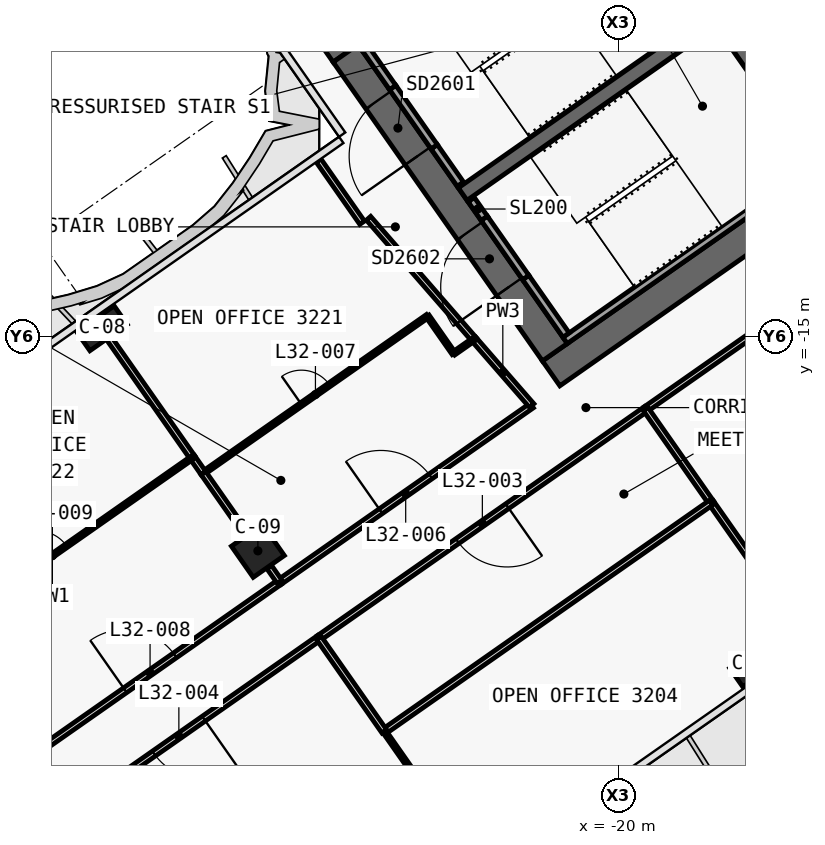
"""IFC4 building model, lengths in metres.
Left out: names, types, materials, properties, quantities, classifications, styles, units other than length and angle.
Written with IfcOpenShell. Run it as: python <this file> out.ifc"""

import sys

from ifc_helpers import new_model, si_unit, direction, frame, frame_2d, origin, origin_2d, place, context, subcontext, project, spatial, polyline, rectangle, outline, extrude, element, fill, save


model = new_model("IFC4")
c1 = context("Model", 3, precision=1e-05, world=origin(), true_north=direction((0.0, 1.0)))
c2 = subcontext(c1, "Body", "Model", "MODEL_VIEW")
j1 = project(units=[si_unit("LENGTHUNIT", "METRE"), si_unit("PLANEANGLEUNIT", "RADIAN")], contexts=[c1])
p1 = place(None, origin())
s1 = spatial("IfcSite", under=j1, at=p1, CompositionType="ELEMENT")
p2 = place(p1, origin())
s2 = spatial("IfcBuilding", under=s1, at=p2, CompositionType="ELEMENT")
p3 = place(p2, frame((0.0, 0.0, 143.7)))
s3 = spatial("IfcBuildingStorey", under=s2, at=p3, CompositionType="ELEMENT", Elevation=143.7)
p4 = place(p3, frame((0.029, 11.984, 0.0), z_axis=(0.0, 0.0, 1.0), x_axis=(-0.819151382952, -0.573577380837, 0.0)))
e1 = element("IfcWall", 1, at=p4, inside=s3, PredefinedType="SHEAR", context=c2, shape_type="SweptSolid", body=[
    extrude(outline(polyline([(33.898, 0.4), (0.56, 0.4), (-0.0, -0.4), (33.898, -0.4), (33.898, 0.4)])), origin(), (0.0, 0.0, 1.0), 3.9),
])
p5 = place(p3, frame((0.029, -0.712, 0.0), z_axis=(0.0, 0.0, 1.0), x_axis=(-0.819151758019, -0.573576845187, 0.0)))
e2 = element("IfcWall", 2, at=p5, inside=s3, PredefinedType="SHEAR", context=c2, shape_type="SweptSolid", body=[
    extrude(outline(polyline([(26.616, 0.4), (0.56, 0.4), (-0.0, -0.4), (26.616, -0.4), (26.616, 0.4)])), origin(), (0.0, 0.0, 1.0), 3.9),
])
p6 = place(p5, frame((2.966, 0.0, 0.0)))
e3 = element("IfcOpeningElement", 3, at=p6, cuts=e2, PredefinedType="OPENING", context=c2, shape_type="SweptSolid", body=[
    extrude(rectangle(XDim=2.4, YDim=2.1, at=frame_2d((1.2, 1.05))), frame((0.0, 0.41, 0.0), z_axis=(0.0, -1.0, 0.0), x_axis=(1.0, 0.0, 0.0)), (0.0, 0.0, 1.0), 0.82),
])
p7 = place(p5, frame((11.916, 0.0, 0.0)))
e4 = element("IfcOpeningElement", 4, at=p7, cuts=e2, PredefinedType="OPENING", context=c2, shape_type="SweptSolid", body=[
    extrude(rectangle(XDim=2.4, YDim=2.1, at=frame_2d((1.2, 1.05))), frame((0.0, 0.41, 0.0), z_axis=(0.0, -1.0, 0.0), x_axis=(1.0, 0.0, 0.0)), (0.0, 0.0, 1.0), 0.82),
])
p8 = place(p3, frame((-21.675, -15.421, 0.0), z_axis=(0.0, 0.0, 1.0), x_axis=(-0.573581815061, 0.819148278049, 0.0)))
e5 = element("IfcWall", 5, at=p8, inside=s3, PredefinedType="SHEAR", context=c2, shape_type="SweptSolid", body=[
    extrude(outline(polyline([(0.0, 0.4), (0.0, -0.4), (9.6, -0.4), (9.6, 0.4), (0.0, 0.4)])), origin(), (0.0, 0.0, 1.0), 3.9),
])
p9 = place(p8, frame((6.3, 0.0, 0.0)))
e6 = element("IfcOpeningElement", 6, at=p9, cuts=e5, PredefinedType="OPENING", context=c2, shape_type="SweptSolid", body=[
    extrude(rectangle(XDim=1.8, YDim=2.1, at=frame_2d((0.9, 1.05))), frame((0.0, 0.41, 0.0), z_axis=(0.0, -1.0, 0.0), x_axis=(1.0, 0.0, 0.0)), (0.0, 0.0, 1.0), 0.82),
])
p10 = place(p8, frame((2.1, 0.0, 0.0)))
e7 = element("IfcOpeningElement", 7, at=p10, cuts=e5, PredefinedType="OPENING", context=c2, shape_type="SweptSolid", body=[
    extrude(rectangle(XDim=1.8, YDim=2.1, at=frame_2d((0.9, 1.05))), frame((0.0, 0.41, 0.0), z_axis=(0.0, -1.0, 0.0), x_axis=(1.0, 0.0, 0.0)), (0.0, 0.0, 1.0), 0.82),
])
p11 = place(p3, frame((-14.63, -10.488, 0.0), z_axis=(0.0, 0.0, 1.0), x_axis=(-0.573611936273, 0.819127185829, 0.0)))
e8 = element("IfcWall", 8, at=p11, inside=s3, PredefinedType="SHEAR", context=c2, shape_type="SweptSolid", body=[
    extrude(outline(polyline([(4.6, 0.2), (0.0, 0.2), (0.0, -0.2), (4.6, -0.2), (4.6, 0.2)])), origin(), (0.0, 0.0, 1.0), 3.9),
])
p12 = place(p3, frame((-2.638, 3.768, 0.0), z_axis=(0.0, 0.0, 1.0), x_axis=(-0.81915267502, -0.573575535572, 0.0)))
e9 = element("IfcWall", 9, at=p12, inside=s3, PredefinedType="SHEAR", context=c2, shape_type="SweptSolid", body=[
    extrude(outline(polyline([(26.2, 0.2), (0.0, 0.2), (0.0, -0.2), (26.2, -0.2), (26.2, 0.2)])), origin(), (0.0, 0.0, 1.0), 3.9),
])
p13 = place(p12, frame((1.169, 0.0, 0.0)))
e10 = element("IfcOpeningElement", 10, at=p13, cuts=e9, PredefinedType="OPENING", context=c2, shape_type="SweptSolid", body=[
    extrude(rectangle(XDim=1.1, YDim=2.1, at=frame_2d((0.55, 1.05))), frame((0.0, 0.21, 0.0), z_axis=(0.0, -1.0, 0.0), x_axis=(1.0, 0.0, 0.0)), (0.0, 0.0, 1.0), 0.42),
])
p14 = place(p12, frame((3.206, 0.0, 0.0)))
e11 = element("IfcOpeningElement", 11, at=p14, cuts=e9, PredefinedType="OPENING", context=c2, shape_type="SweptSolid", body=[
    extrude(rectangle(XDim=1.1, YDim=2.1, at=frame_2d((0.55, 1.05))), frame((0.0, 0.21, 0.0), z_axis=(0.0, -1.0, 0.0), x_axis=(1.0, 0.0, 0.0)), (0.0, 0.0, 1.0), 0.42),
])
p15 = place(p12, frame((5.244, 0.0, 0.0)))
e12 = element("IfcOpeningElement", 12, at=p15, cuts=e9, PredefinedType="OPENING", context=c2, shape_type="SweptSolid", body=[
    extrude(rectangle(XDim=1.1, YDim=2.1, at=frame_2d((0.55, 1.05))), frame((0.0, 0.21, 0.0), z_axis=(0.0, -1.0, 0.0), x_axis=(1.0, 0.0, 0.0)), (0.0, 0.0, 1.0), 0.42),
])
p16 = place(p12, frame((7.281, 0.0, 0.0)))
e13 = element("IfcOpeningElement", 13, at=p16, cuts=e9, PredefinedType="OPENING", context=c2, shape_type="SweptSolid", body=[
    extrude(rectangle(XDim=1.1, YDim=2.1, at=frame_2d((0.55, 1.05))), frame((0.0, 0.21, 0.0), z_axis=(0.0, -1.0, 0.0), x_axis=(1.0, 0.0, 0.0)), (0.0, 0.0, 1.0), 0.42),
])
p17 = place(p12, frame((9.688, 0.0, 0.0)))
e14 = element("IfcOpeningElement", 14, at=p17, cuts=e9, PredefinedType="OPENING", context=c2, shape_type="SweptSolid", body=[
    extrude(rectangle(XDim=1.1, YDim=2.1, at=frame_2d((0.55, 1.05))), frame((0.0, 0.21, 0.0), z_axis=(0.0, -1.0, 0.0), x_axis=(1.0, 0.0, 0.0)), (0.0, 0.0, 1.0), 0.42),
])
p18 = place(p12, frame((11.863, 0.0, 0.0)))
e15 = element("IfcOpeningElement", 15, at=p18, cuts=e9, PredefinedType="OPENING", context=c2, shape_type="SweptSolid", body=[
    extrude(rectangle(XDim=1.1, YDim=2.1, at=frame_2d((0.55, 1.05))), frame((0.0, 0.21, 0.0), z_axis=(0.0, -1.0, 0.0), x_axis=(1.0, 0.0, 0.0)), (0.0, 0.0, 1.0), 0.42),
])
p19 = place(p12, frame((14.038, 0.0, 0.0)))
e16 = element("IfcOpeningElement", 16, at=p19, cuts=e9, PredefinedType="OPENING", context=c2, shape_type="SweptSolid", body=[
    extrude(rectangle(XDim=1.1, YDim=2.1, at=frame_2d((0.55, 1.05))), frame((0.0, 0.21, 0.0), z_axis=(0.0, -1.0, 0.0), x_axis=(1.0, 0.0, 0.0)), (0.0, 0.0, 1.0), 0.42),
])
p20 = place(p12, frame((16.212, 0.0, 0.0)))
e17 = element("IfcOpeningElement", 17, at=p20, cuts=e9, PredefinedType="OPENING", context=c2, shape_type="SweptSolid", body=[
    extrude(rectangle(XDim=1.1, YDim=2.1, at=frame_2d((0.55, 1.05))), frame((0.0, 0.21, 0.0), z_axis=(0.0, -1.0, 0.0), x_axis=(1.0, 0.0, 0.0)), (0.0, 0.0, 1.0), 0.42),
])
for number, where, z_axis, x_axis in (
    (18, (-16.41, -23.637, 0.0), (0.0, 0.0, 1.0), (-0.819, -0.574, 0.0)),
    (19, (-33.591, -14.792, 0.0), (0.0, 0.0, 1.0), (-0.819, -0.574, 0.0)),
):
    element("IfcColumn", number, at=place(p3, frame(where, z_axis=z_axis, x_axis=x_axis)), inside=s3, PredefinedType="COLUMN", context=c2, shape_type="SweptSolid", body=[
        extrude(rectangle(XDim=1.2, YDim=0.6, at=origin_2d()), origin(), (0.0, 0.0, 1.0), 3.9),
    ])
p21 = place(p3, frame((-29.49, -20.649, 0.0), z_axis=(0.0, 0.0, 1.0), x_axis=(-0.819152044289, -0.573576436351, 0.0)))
e20 = element("IfcColumn", 20, at=p21, inside=s3, PredefinedType="COLUMN", context=c2, shape_type="SweptSolid", body=[
    extrude(rectangle(XDim=1.0, YDim=1.0, at=origin_2d()), origin(), (0.0, 0.0, 1.0), 3.9),
])
p22 = place(p3, frame((-24.162, -10.998, 0.0), z_axis=(0.0, 0.0, 1.0), x_axis=(-0.573612502218, 0.819126789514, 0.0)))
e21 = element("IfcWall", 21, at=p22, inside=s3, PredefinedType="SOLIDWALL", context=c2, shape_type="SweptSolid", body=[
    extrude(rectangle(XDim=1.2, YDim=0.2, at=frame_2d((0.6, 0.0))), origin(), (0.0, 0.0, 1.0), 3.62),
])
p23 = place(p3, frame((-25.94, -8.458, 0.0), z_axis=(0.0, 0.0, 1.0), x_axis=(-0.573619628835, 0.819121798889, 0.0)))
e22 = element("IfcWall", 22, at=p23, inside=s3, PredefinedType="SOLIDWALL", context=c2, shape_type="SweptSolid", body=[
    extrude(rectangle(XDim=1.25, YDim=0.2, at=frame_2d((0.625, 0.0))), origin(), (0.0, 0.0, 1.0), 3.62),
])
p24 = place(p3, frame((-24.85, -10.014, 2.15), z_axis=(0.0, 0.0, 1.0), x_axis=(-0.573505465124, 0.819201734296, 0.0)))
e23 = element("IfcWall", 23, at=p24, inside=s3, PredefinedType="SOLIDWALL", context=c2, shape_type="SweptSolid", body=[
    extrude(rectangle(XDim=1.9, YDim=0.2, at=frame_2d((0.95, 0.0))), origin(), (0.0, 0.0, 1.0), 1.47),
])
p25 = place(p3, frame((-14.851, -10.521, 0.0), z_axis=(0.0, 0.0, 1.0), x_axis=(-0.819141584393, -0.57359137434, 0.0)))
e24 = element("IfcWall", 24, at=p25, inside=s3, PredefinedType="SOLIDWALL", context=c2, shape_type="SweptSolid", body=[
    extrude(rectangle(XDim=8.0, YDim=0.2, at=frame_2d((4.0, 0.0))), origin(), (0.0, 0.0, 1.0), 3.62),
])
p26 = place(p3, frame((-21.38, -14.97, 0.0), z_axis=(0.0, 0.0, 1.0), x_axis=(-0.573559770908, 0.819163713305, 0.0)))
e25 = element("IfcWall", 25, at=p26, inside=s3, PredefinedType="SOLIDWALL", context=c2, shape_type="SweptSolid", body=[
    extrude(rectangle(XDim=1.85, YDim=0.2, at=frame_2d((0.925, 0.0))), origin(), (0.0, 0.0, 1.0), 3.62),
])
p27 = place(p3, frame((-23.531, -11.898, 0.0), z_axis=(0.0, 0.0, 1.0), x_axis=(-0.573708088123, 0.819059844958, 0.0)))
e26 = element("IfcWall", 26, at=p27, inside=s3, PredefinedType="SOLIDWALL", context=c2, shape_type="SweptSolid", body=[
    extrude(rectangle(XDim=0.6, YDim=0.2, at=frame_2d((0.3, 0.0))), origin(), (0.0, 0.0, 1.0), 3.62),
])
p28 = place(p3, frame((-22.441, -13.455, 2.15), z_axis=(0.0, 0.0, 1.0), x_axis=(-0.573591692345, 0.819141361715, 0.0)))
e27 = element("IfcWall", 27, at=p28, inside=s3, PredefinedType="SOLIDWALL", context=c2, shape_type="SweptSolid", body=[
    extrude(rectangle(XDim=1.9, YDim=0.2, at=frame_2d((0.95, 0.0))), origin(), (0.0, 0.0, 1.0), 1.47),
])
p29 = place(p3, frame((-28.917, -21.469, 0.0), z_axis=(0.0, 0.0, 1.0), x_axis=(0.819148353684, 0.573581707045, 0.0)))
e28 = element("IfcWall", 28, at=p29, inside=s3, PredefinedType="PARTITIONING", context=c2, shape_type="SweptSolid", body=[
    extrude(rectangle(XDim=8.099, YDim=0.15, at=frame_2d((4.049, 0.0))), origin(), (0.0, 0.0, 1.0), 3.0),
])
p30 = place(p29, frame((3.25, 0.0, 0.0)))
e29 = element("IfcOpeningElement", 29, at=p30, cuts=e28, PredefinedType="OPENING", context=c2, shape_type="SweptSolid", body=[
    extrude(rectangle(XDim=1.6, YDim=2.1, at=frame_2d((0.8, 1.05))), frame((0.0, 0.085, 0.0), z_axis=(0.0, -1.0, 0.0), x_axis=(1.0, 0.0, 0.0)), (0.0, 0.0, 1.0), 0.17),
])
p31 = place(p3, frame((-35.739, -26.247, 0.0), z_axis=(0.0, 0.0, 1.0), x_axis=(0.819128663043, 0.573609826783, 0.0)))
e30 = element("IfcWall", 30, at=p31, inside=s3, PredefinedType="PARTITIONING", context=c2, shape_type="SweptSolid", body=[
    extrude(rectangle(XDim=8.332, YDim=0.15, at=frame_2d((4.166, 0.0))), origin(), (0.0, 0.0, 1.0), 3.0),
])
p32 = place(p31, frame((3.366, 0.0, 0.0)))
e31 = element("IfcOpeningElement", 31, at=p32, cuts=e30, PredefinedType="OPENING", context=c2, shape_type="SweptSolid", body=[
    extrude(rectangle(XDim=1.6, YDim=2.1, at=frame_2d((0.8, 1.05))), frame((0.0, 0.085, 0.0), z_axis=(0.0, -1.0, 0.0), x_axis=(1.0, 0.0, 0.0)), (0.0, 0.0, 1.0), 0.17),
])
p33 = place(p3, frame((-9.451, -10.036, 0.0), z_axis=(0.0, 0.0, 1.0), x_axis=(-0.81915738424, -0.573568810035, 0.0)))
e32 = element("IfcWall", 32, at=p33, inside=s3, PredefinedType="PARTITIONING", context=c2, shape_type="SweptSolid", body=[
    extrude(rectangle(XDim=12.004, YDim=0.15, at=frame_2d((6.002, 0.0))), origin(), (0.0, 0.0, 1.0), 3.0),
])
p34 = place(p33, frame((5.202, 0.0, 0.0)))
e33 = element("IfcOpeningElement", 33, at=p34, cuts=e32, PredefinedType="OPENING", context=c2, shape_type="SweptSolid", body=[
    extrude(rectangle(XDim=1.6, YDim=2.1, at=frame_2d((0.8, 1.05))), frame((0.0, 0.085, 0.0), z_axis=(0.0, -1.0, 0.0), x_axis=(1.0, 0.0, 0.0)), (0.0, 0.0, 1.0), 0.17),
])
p35 = place(p3, frame((-19.281, -16.919, 0.0), z_axis=(0.0, 0.0, 1.0), x_axis=(-0.819145647741, -0.57358557146, 0.0)))
e34 = element("IfcWall", 34, at=p35, inside=s3, PredefinedType="PARTITIONING", context=c2, shape_type="SweptSolid", body=[
    extrude(rectangle(XDim=10.504, YDim=0.15, at=frame_2d((5.252, 0.0))), origin(), (0.0, 0.0, 1.0), 3.0),
])
p36 = place(p35, frame((4.452, 0.0, 0.0)))
e35 = element("IfcOpeningElement", 35, at=p36, cuts=e34, PredefinedType="OPENING", context=c2, shape_type="SweptSolid", body=[
    extrude(rectangle(XDim=1.6, YDim=2.1, at=frame_2d((0.8, 1.05))), frame((0.0, 0.085, 0.0), z_axis=(0.0, -1.0, 0.0), x_axis=(1.0, 0.0, 0.0)), (0.0, 0.0, 1.0), 0.17),
])
p37 = place(p3, frame((-27.882, -22.941, 0.0), z_axis=(0.0, 0.0, 1.0), x_axis=(-0.81915291695, -0.57357519006, 0.0)))
e36 = element("IfcWall", 36, at=p37, inside=s3, PredefinedType="PARTITIONING", context=c2, shape_type="SweptSolid", body=[
    extrude(rectangle(XDim=9.002, YDim=0.15, at=frame_2d((4.501, 0.0))), origin(), (0.0, 0.0, 1.0), 2.9),
])
p38 = place(p37, frame((3.701, 0.0, 0.0)))
e37 = element("IfcOpeningElement", 37, at=p38, cuts=e36, PredefinedType="OPENING", context=c2, shape_type="SweptSolid", body=[
    extrude(rectangle(XDim=1.6, YDim=2.1, at=frame_2d((0.8, 1.05))), frame((0.0, 0.085, 0.0), z_axis=(0.0, -1.0, 0.0), x_axis=(1.0, 0.0, 0.0)), (0.0, 0.0, 1.0), 0.17),
])
p39 = place(p3, frame((-26.746, -12.014, 0.0), z_axis=(0.0, 0.0, 1.0), x_axis=(-0.573568836472, 0.819157365729, 0.0)))
e38 = element("IfcWall", 38, at=p39, inside=s3, PredefinedType="PARTITIONING", context=c2, shape_type="SweptSolid", body=[
    extrude(rectangle(XDim=2.0, YDim=0.15, at=frame_2d((1.0, 0.0))), origin(), (0.0, 0.0, 1.0), 3.0),
])
p40 = place(p3, frame((-23.802, -15.082, 0.0), z_axis=(0.0, 0.0, 1.0), x_axis=(-0.656784983898, 0.754077903751, 0.0)))
e39 = element("IfcWall", 39, at=p40, inside=s3, PredefinedType="PARTITIONING", context=c2, shape_type="SweptSolid", body=[
    extrude(rectangle(XDim=4.226, YDim=0.15, at=frame_2d((2.113, 0.0))), origin(), (0.0, 0.0, 1.0), 3.62),
])
p41 = place(p3, frame((-22.284, -16.826, 0.0), z_axis=(0.0, 0.0, 1.0), x_axis=(-0.656749820099, 0.754108529192, 0.0)))
e40 = element("IfcWall", 40, at=p41, inside=s3, PredefinedType="PARTITIONING", context=c2, shape_type="SweptSolid", body=[
    extrude(rectangle(XDim=2.317, YDim=0.15, at=frame_2d((1.159, 0.0))), origin(), (0.0, 0.0, 1.0), 3.0),
])
p42 = place(p3, frame((-24.337, -15.454, 0.0), z_axis=(0.0, 0.0, 1.0), x_axis=(0.819196675611, 0.573512690938, 0.0)))
e41 = element("IfcWall", 41, at=p42, inside=s3, PredefinedType="PARTITIONING", context=c2, shape_type="SweptSolid", body=[
    extrude(rectangle(XDim=0.651, YDim=0.1, at=frame_2d((0.325, 0.0))), origin(), (0.0, 0.0, 1.0), 3.62),
])
p43 = place(p3, frame((-25.026, -14.47, 0.0), z_axis=(0.0, 0.0, 1.0), x_axis=(0.57359875229, -0.819136418047, 0.0)))
e42 = element("IfcWall", 42, at=p43, inside=s3, PredefinedType="PARTITIONING", context=c2, shape_type="SweptSolid", body=[
    extrude(rectangle(XDim=1.201, YDim=0.1, at=frame_2d((0.601, 0.0))), origin(), (0.0, 0.0, 1.0), 3.62),
])
p44 = place(p3, frame((-30.924, -18.6, 0.0), z_axis=(0.0, 0.0, 1.0), x_axis=(0.81914589004, 0.573585225429, 0.0)))
e43 = element("IfcWall", 43, at=p44, inside=s3, PredefinedType="PARTITIONING", context=c2, shape_type="SweptSolid", body=[
    extrude(rectangle(XDim=7.2, YDim=0.1, at=frame_2d((3.6, 0.0))), origin(), (0.0, 0.0, 1.0), 3.0),
])
p45 = place(p44, frame((3.15, 0.0, 0.0)))
e44 = element("IfcOpeningElement", 44, at=p45, cuts=e43, PredefinedType="OPENING", context=c2, shape_type="SweptSolid", body=[
    extrude(rectangle(XDim=0.9, YDim=2.1, at=frame_2d((0.45, 1.05))), frame((0.0, 0.06, 0.0), z_axis=(0.0, -1.0, 0.0), x_axis=(1.0, 0.0, 0.0)), (0.0, 0.0, 1.0), 0.12),
])
p46 = place(p3, frame((-31.21, -18.192, 0.0), z_axis=(0.0, 0.0, 1.0), x_axis=(-0.573556436342, 0.819166048082, 0.0)))
e45 = element("IfcWall", 45, at=p46, inside=s3, PredefinedType="PARTITIONING", context=c2, shape_type="SweptSolid", body=[
    extrude(rectangle(XDim=3.831, YDim=0.15, at=frame_2d((1.916, 0.0))), origin(), (0.0, 0.0, 1.0), 3.0),
])
p47 = place(p3, frame((-30.924, -18.6, 0.0), z_axis=(0.0, 0.0, 1.0), x_axis=(-0.573560455774, 0.819163233777, 0.0)))
e46 = element("IfcWall", 46, at=p47, inside=s3, PredefinedType="PARTITIONING", context=c2, shape_type="SweptSolid", body=[
    extrude(rectangle(XDim=0.501, YDim=0.15, at=frame_2d((0.25, 0.0))), origin(), (0.0, 0.0, 1.0), 3.0),
])
p48 = place(p3, frame((-28.916, -21.468, 0.0), z_axis=(0.0, 0.0, 1.0), x_axis=(-0.57322336738, 0.819399152483, 0.0)))
e47 = element("IfcWall", 47, at=p48, inside=s3, PredefinedType="PARTITIONING", context=c2, shape_type="SweptSolid", body=[
    extrude(rectangle(XDim=0.48, YDim=0.15, at=frame_2d((0.24, 0.0))), origin(), (0.0, 0.0, 1.0), 3.0),
])
p49 = place(p3, frame((-29.788, -20.223, 0.0), z_axis=(0.0, 0.0, 1.0), x_axis=(-0.573561636977, 0.819162406723, 0.0)))
e48 = element("IfcWall", 48, at=p49, inside=s3, PredefinedType="PARTITIONING", context=c2, shape_type="SweptSolid", body=[
    extrude(rectangle(XDim=1.98, YDim=0.15, at=frame_2d((0.99, 0.0))), origin(), (0.0, 0.0, 1.0), 3.0),
])
p50 = place(p3, frame((-38.583, -23.353, 0.0), z_axis=(0.0, 0.0, 1.0), x_axis=(0.819141427692, 0.573591598124, 0.0)))
e49 = element("IfcWall", 49, at=p50, inside=s3, PredefinedType="PARTITIONING", context=c2, shape_type="SweptSolid", body=[
    extrude(rectangle(XDim=9.0, YDim=0.1, at=frame_2d((4.5, 0.0))), origin(), (0.0, 0.0, 1.0), 2.9),
])
p51 = place(p50, frame((4.05, 0.0, 0.0)))
e50 = element("IfcOpeningElement", 50, at=p51, cuts=e49, PredefinedType="OPENING", context=c2, shape_type="SweptSolid", body=[
    extrude(rectangle(XDim=0.9, YDim=2.1, at=frame_2d((0.45, 1.05))), frame((0.0, 0.06, 0.0), z_axis=(0.0, -1.0, 0.0), x_axis=(1.0, 0.0, 0.0)), (0.0, 0.0, 1.0), 0.12),
])
p52 = place(p3, frame((-17.561, -19.379, 0.0), z_axis=(0.0, 0.0, 1.0), x_axis=(-0.573604249862, 0.819132568355, 0.0)))
e51 = element("IfcWall", 51, at=p52, inside=s3, PredefinedType="PARTITIONING", context=c2, shape_type="SweptSolid", body=[
    extrude(rectangle(XDim=3.002, YDim=0.15, at=frame_2d((1.501, 0.0))), origin(), (0.0, 0.0, 1.0), 3.62),
])
p53 = place(p3, frame((-16.415, -21.016, 0.0), z_axis=(0.0, 0.0, 1.0), x_axis=(-0.573560601885, 0.819163131473, 0.0)))
e52 = element("IfcWall", 52, at=p53, inside=s3, PredefinedType="PARTITIONING", context=c2, shape_type="SweptSolid", body=[
    extrude(rectangle(XDim=2.001, YDim=0.15, at=frame_2d((1.0, 0.0))), origin(), (0.0, 0.0, 1.0), 3.62),
])
p54 = place(p3, frame((-17.562, -19.377, 0.0), z_axis=(0.0, 0.0, 1.0), x_axis=(-0.81914452344, -0.573587177086, 0.0)))
e53 = element("IfcWall", 53, at=p54, inside=s3, PredefinedType="PARTITIONING", context=c2, shape_type="SweptSolid", body=[
    extrude(rectangle(XDim=10.5, YDim=0.15, at=frame_2d((5.25, 0.0))), origin(), (0.0, 0.0, 1.0), 3.0),
])
p55 = place(p3, frame((-26.163, -25.4, 0.0), z_axis=(0.0, 0.0, 1.0), x_axis=(-0.573615254604, 0.819124862085, 0.0)))
e54 = element("IfcWall", 54, at=p55, inside=s3, PredefinedType="PARTITIONING", context=c2, shape_type="SweptSolid", body=[
    extrude(rectangle(XDim=3.0, YDim=0.15, at=frame_2d((1.5, 0.0))), origin(), (0.0, 0.0, 1.0), 3.0),
])
p56 = place(p3, frame((-26.162, -25.401, 0.0), z_axis=(0.0, 0.0, 1.0), x_axis=(0.573568836472, -0.819157365729, 0.0)))
e55 = element("IfcWall", 55, at=p56, inside=s3, PredefinedType="PARTITIONING", context=c2, shape_type="SweptSolid", body=[
    extrude(rectangle(XDim=2.0, YDim=0.1, at=frame_2d((1.0, 0.0))), origin(), (0.0, 0.0, 1.0), 3.0),
])
p57 = place(p9, origin())
e56 = element("IfcDoor", 56, at=p57, inside=s3, OperationType="DOUBLE_DOOR_SINGLE_SWING", PredefinedType="DOOR", context=c2, shape_type="SweptSolid", body=[
    extrude(rectangle(XDim=1.8, YDim=2.1, at=frame_2d((0.9, 1.05))), frame((0.0, 0.025, 0.0), z_axis=(0.0, -1.0, 0.0), x_axis=(1.0, 0.0, 0.0)), (0.0, 0.0, 1.0), 0.05),
])
fill(e6, e56)
p58 = place(p10, origin())
e57 = element("IfcDoor", 57, at=p58, inside=s3, OperationType="DOUBLE_DOOR_SINGLE_SWING", PredefinedType="DOOR", context=c2, shape_type="SweptSolid", body=[
    extrude(rectangle(XDim=1.8, YDim=2.1, at=frame_2d((0.9, 1.05))), frame((0.0, 0.025, 0.0), z_axis=(0.0, -1.0, 0.0), x_axis=(1.0, 0.0, 0.0)), (0.0, 0.0, 1.0), 0.05),
])
fill(e7, e57)
p59 = place(p36, origin())
e58 = element("IfcDoor", 58, at=p59, inside=s3, OperationType="DOUBLE_DOOR_SINGLE_SWING", PredefinedType="DOOR", context=c2, shape_type="SweptSolid", body=[
    extrude(rectangle(XDim=1.6, YDim=2.1, at=frame_2d((0.8, 1.05))), frame((0.0, 0.025, 0.0), z_axis=(0.0, -1.0, 0.0), x_axis=(1.0, 0.0, 0.0)), (0.0, 0.0, 1.0), 0.05),
])
fill(e35, e58)
p60 = place(p38, origin())
e59 = element("IfcDoor", 59, at=p60, inside=s3, OperationType="DOUBLE_DOOR_SINGLE_SWING", PredefinedType="DOOR", context=c2, shape_type="SweptSolid", body=[
    extrude(rectangle(XDim=1.6, YDim=2.1, at=frame_2d((0.8, 1.05))), frame((0.0, 0.025, 0.0), z_axis=(0.0, -1.0, 0.0), x_axis=(1.0, 0.0, 0.0)), (0.0, 0.0, 1.0), 0.05),
])
fill(e37, e59)
p61 = place(p30, origin())
e60 = element("IfcDoor", 60, at=p61, inside=s3, OperationType="DOUBLE_DOOR_SINGLE_SWING", PredefinedType="DOOR", context=c2, shape_type="SweptSolid", body=[
    extrude(rectangle(XDim=1.6, YDim=2.1, at=frame_2d((0.8, 1.05))), frame((0.0, 0.025, 0.0), z_axis=(0.0, -1.0, 0.0), x_axis=(1.0, 0.0, 0.0)), (0.0, 0.0, 1.0), 0.05),
])
fill(e29, e60)
p62 = place(p45, origin())
e61 = element("IfcDoor", 61, at=p62, inside=s3, OperationType="SINGLE_SWING_LEFT", PredefinedType="DOOR", context=c2, shape_type="SweptSolid", body=[
    extrude(rectangle(XDim=0.9, YDim=2.1, at=frame_2d((0.45, 1.05))), frame((0.0, 0.025, 0.0), z_axis=(0.0, -1.0, 0.0), x_axis=(1.0, 0.0, 0.0)), (0.0, 0.0, 1.0), 0.05),
])
fill(e44, e61)
p63 = place(p32, origin())
e62 = element("IfcDoor", 62, at=p63, inside=s3, OperationType="DOUBLE_DOOR_SINGLE_SWING", PredefinedType="DOOR", context=c2, shape_type="SweptSolid", body=[
    extrude(rectangle(XDim=1.6, YDim=2.1, at=frame_2d((0.8, 1.05))), frame((0.0, 0.025, 0.0), z_axis=(0.0, -1.0, 0.0), x_axis=(1.0, 0.0, 0.0)), (0.0, 0.0, 1.0), 0.05),
])
fill(e31, e62)
p64 = place(p51, origin())
e63 = element("IfcDoor", 63, at=p64, inside=s3, OperationType="SINGLE_SWING_RIGHT", PredefinedType="DOOR", context=c2, shape_type="SweptSolid", body=[
    extrude(rectangle(XDim=0.9, YDim=2.1, at=frame_2d((0.45, 1.05))), frame((0.0, 0.025, 0.0), z_axis=(0.0, -1.0, 0.0), x_axis=(1.0, 0.0, 0.0)), (0.0, 0.0, 1.0), 0.05),
])
fill(e50, e63)
save(model, sys.argv[1])
